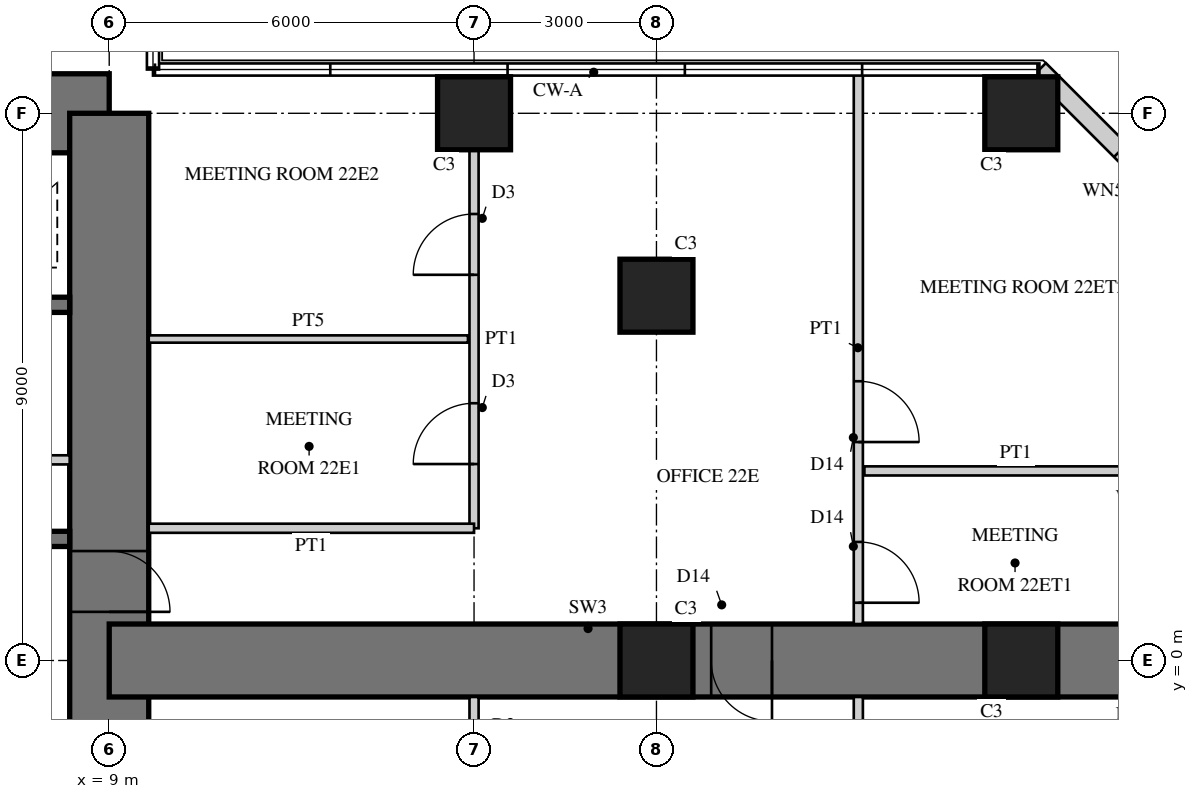
"""IFC4 building model, lengths in metres.
Left out: names, types, materials, properties, quantities, classifications, styles, units other than length and angle.
Written with IfcOpenShell. Run it as: python <this file> out.ifc"""

import sys

from ifc_helpers import new_model, si_unit, direction, frame, frame_2d, origin, origin_2d, place, context, subcontext, project, spatial, rectangle, extrude, element, fill, save


model = new_model("IFC4")
c1 = context("Model", 3, precision=1e-05, world=origin(), true_north=direction((0.0, 1.0)))
c2 = subcontext(c1, "Body", "Model", "MODEL_VIEW")
j1 = project(units=[si_unit("LENGTHUNIT", "METRE"), si_unit("PLANEANGLEUNIT", "RADIAN")], contexts=[c1])
p1 = place(None, origin())
s1 = spatial("IfcSite", under=j1, at=p1, CompositionType="ELEMENT")
p2 = place(p1, origin())
s2 = spatial("IfcBuilding", under=s1, at=p2, CompositionType="ELEMENT")
p3 = place(p2, frame((0.0, 0.0, 91.5)))
s3 = spatial("IfcBuildingStorey", under=s2, at=p3, CompositionType="ELEMENT", Elevation=91.5)
p4 = place(p3, frame((9.0, 9.0, 0.0), z_axis=(0.0, 0.0, 1.0), x_axis=(-1.0, 0.0, 0.0)))
e1 = element("IfcWall", 1, at=p4, inside=s3, PredefinedType="SHEAR", context=c2, shape_type="SweptSolid", body=[
    extrude(rectangle(XDim=18.0, YDim=1.3, at=frame_2d((9.0, 0.0))), origin(), (0.0, 0.0, 1.0), 4.0),
])
p5 = place(p4, frame((9.8, 0.0, 0.0)))
e2 = element("IfcOpeningElement", 2, at=p5, cuts=e1, PredefinedType="OPENING", context=c2, shape_type="SweptSolid", body=[
    extrude(rectangle(XDim=1.0, YDim=2.4, at=frame_2d((0.5, 1.2))), frame((0.0, 0.66, 0.0), z_axis=(0.0, -1.0, 0.0), x_axis=(1.0, 0.0, 0.0)), (0.0, 0.0, 1.0), 1.32),
])
p6 = place(p3, frame((9.0, -9.0, 0.0), z_axis=(0.0, 0.0, 1.0), x_axis=(0.0, 1.0, 0.0)))
e3 = element("IfcWall", 3, at=p6, inside=s3, PredefinedType="SHEAR", context=c2, shape_type="SweptSolid", body=[
    extrude(rectangle(XDim=18.0, YDim=1.3, at=frame_2d((9.0, 0.0))), origin(), (0.0, 0.0, 1.0), 4.0),
])
p7 = place(p6, frame((9.8, 0.0, 0.0)))
e4 = element("IfcOpeningElement", 4, at=p7, cuts=e3, PredefinedType="OPENING", context=c2, shape_type="SweptSolid", body=[
    extrude(rectangle(XDim=1.0, YDim=2.4, at=frame_2d((0.5, 1.2))), frame((0.0, 0.66, 0.0), z_axis=(0.0, -1.0, 0.0), x_axis=(1.0, 0.0, 0.0)), (0.0, 0.0, 1.0), 1.32),
])
p8 = place(p3, frame((1.925, 2.0, 0.0), z_axis=(0.0, 0.0, 1.0), x_axis=(1.0, 0.0, 0.0)))
e5 = element("IfcWall", 5, at=p8, inside=s3, PredefinedType="SHEAR", context=c2, shape_type="SweptSolid", body=[
    extrude(rectangle(XDim=6.425, YDim=0.25, at=frame_2d((3.212, 0.0))), origin(), (0.0, 0.0, 1.0), 4.0),
])
p9 = place(p3, frame((1.925, 5.85, 0.0), z_axis=(0.0, 0.0, 1.0), x_axis=(1.0, 0.0, 0.0)))
e6 = element("IfcWall", 6, at=p9, inside=s3, PredefinedType="SHEAR", context=c2, shape_type="SweptSolid", body=[
    extrude(rectangle(XDim=6.425, YDim=0.25, at=frame_2d((3.212, 0.0))), origin(), (0.0, 0.0, 1.0), 4.0),
])
p10 = place(p9, frame((0.454, 0.0, 0.0)))
e7 = element("IfcOpeningElement", 7, at=p10, cuts=e6, PredefinedType="OPENING", context=c2, shape_type="SweptSolid", body=[
    extrude(rectangle(XDim=1.1, YDim=2.2, at=frame_2d((0.55, 1.1))), frame((0.0, 0.135, 0.0), z_axis=(0.0, -1.0, 0.0), x_axis=(1.0, 0.0, 0.0)), (0.0, 0.0, 1.0), 0.27),
])
p11 = place(p9, frame((2.663, 0.0, 0.0)))
e8 = element("IfcOpeningElement", 8, at=p11, cuts=e6, PredefinedType="OPENING", context=c2, shape_type="SweptSolid", body=[
    extrude(rectangle(XDim=1.1, YDim=2.2, at=frame_2d((0.55, 1.1))), frame((0.0, 0.135, 0.0), z_axis=(0.0, -1.0, 0.0), x_axis=(1.0, 0.0, 0.0)), (0.0, 0.0, 1.0), 0.27),
])
p12 = place(p9, frame((4.871, 0.0, 0.0)))
e9 = element("IfcOpeningElement", 9, at=p12, cuts=e6, PredefinedType="OPENING", context=c2, shape_type="SweptSolid", body=[
    extrude(rectangle(XDim=1.1, YDim=2.2, at=frame_2d((0.55, 1.1))), frame((0.0, 0.135, 0.0), z_axis=(0.0, -1.0, 0.0), x_axis=(1.0, 0.0, 0.0)), (0.0, 0.0, 1.0), 0.27),
])
p13 = place(p3, frame((1.925, 3.3, 0.0), z_axis=(0.0, 0.0, 1.0), x_axis=(1.0, 0.0, 0.0)))
e10 = element("IfcWall", 10, at=p13, inside=s3, PredefinedType="PARTITIONING", context=c2, shape_type="SweptSolid", body=[
    extrude(rectangle(XDim=6.425, YDim=0.15, at=frame_2d((3.212, 0.0))), origin(), (0.0, 0.0, 1.0), 4.0),
])
p14 = place(p13, frame((0.075, 0.0, 0.0)))
e11 = element("IfcOpeningElement", 11, at=p14, cuts=e10, PredefinedType="OPENING", context=c2, shape_type="SweptSolid", body=[
    extrude(rectangle(XDim=0.8, YDim=2.1, at=frame_2d((0.4, 1.05))), frame((0.0, 0.085, 0.0), z_axis=(0.0, -1.0, 0.0), x_axis=(1.0, 0.0, 0.0)), (0.0, 0.0, 1.0), 0.17),
])
p15 = place(p13, frame((3.675, 0.0, 0.0)))
e12 = element("IfcOpeningElement", 12, at=p15, cuts=e10, PredefinedType="OPENING", context=c2, shape_type="SweptSolid", body=[
    extrude(rectangle(XDim=0.8, YDim=2.1, at=frame_2d((0.4, 1.05))), frame((0.0, 0.085, 0.0), z_axis=(0.0, -1.0, 0.0), x_axis=(1.0, 0.0, 0.0)), (0.0, 0.0, 1.0), 0.17),
])
p16 = place(p3, frame((9.0, 0.0, 0.0), z_axis=(0.0, 0.0, 1.0), x_axis=(1.0, 0.0, 0.0)))
e13 = element("IfcWall", 13, at=p16, inside=s3, PredefinedType="SHEAR", context=c2, shape_type="SweptSolid", body=[
    extrude(rectangle(XDim=18.0, YDim=1.2, at=frame_2d((9.0, 0.0))), origin(), (0.0, 0.0, 1.0), 4.0),
])
p17 = place(p16, frame((9.9, 0.0, 0.0)))
e14 = element("IfcOpeningElement", 14, at=p17, cuts=e13, PredefinedType="OPENING", context=c2, shape_type="SweptSolid", body=[
    extrude(rectangle(XDim=1.0, YDim=2.2, at=frame_2d((0.5, 1.1))), frame((0.0, 0.61, 0.0), z_axis=(0.0, -1.0, 0.0), x_axis=(1.0, 0.0, 0.0)), (0.0, 0.0, 1.0), 1.22),
])
for number, where, z_axis, x_axis in (
    (15, (15.0, 9.0, 0.0), (0.0, 0.0, 1.0), (1.0, 0.0, 0.0)),
    (16, (24.0, 9.0, 0.0), (0.0, 0.0, 1.0), (1.0, 0.0, 0.0)),
    (17, (18.0, 0.0, 0.0), (0.0, 0.0, 1.0), (1.0, 0.0, 0.0)),
    (18, (18.0, 6.0, 0.0), (0.0, 0.0, 1.0), (1.0, 0.0, 0.0)),
    (19, (24.0, 0.0, 0.0), (0.0, 0.0, 1.0), (1.0, 0.0, 0.0)),
):
    element("IfcColumn", number, at=place(p3, frame(where, z_axis=z_axis, x_axis=x_axis)), inside=s3, PredefinedType="COLUMN", context=c2, shape_type="SweptSolid", body=[
        extrude(rectangle(XDim=1.2, YDim=1.2, at=origin_2d()), origin(), (0.0, 0.0, 1.0), 4.0),
    ])
p18 = place(p3, frame((27.6, 6.418, 0.0), z_axis=(0.0, 0.0, 1.0), x_axis=(-0.707106781187, 0.707106781187, 0.0)))
e20 = element("IfcWall", 20, at=p18, inside=s3, PredefinedType="SOLIDWALL", context=c2, shape_type="SweptSolid", body=[
    extrude(rectangle(XDim=4.669, YDim=0.3, at=frame_2d((2.335, 0.0))), origin(), (0.0, 0.0, 1.0), 3.75),
])
p19 = place(p18, frame((1.885, 0.0, 0.3)))
e21 = element("IfcOpeningElement", 21, at=p19, cuts=e20, PredefinedType="OPENING", context=c2, shape_type="SweptSolid", body=[
    extrude(rectangle(XDim=0.9, YDim=2.4, at=frame_2d((0.45, 1.2))), frame((0.0, 0.16, 0.0), z_axis=(0.0, -1.0, 0.0), x_axis=(1.0, 0.0, 0.0)), (0.0, 0.0, 1.0), 0.32),
])
p20 = place(p3, frame((15.0, 2.175, 0.0), z_axis=(0.0, 0.0, 1.0), x_axis=(0.0, 1.0, 0.0)))
e22 = element("IfcWall", 22, at=p20, inside=s3, PredefinedType="PARTITIONING", context=c2, shape_type="SweptSolid", body=[
    extrude(rectangle(XDim=6.225, YDim=0.15, at=frame_2d((3.112, 0.0))), origin(), (0.0, 0.0, 1.0), 2.7),
])
p21 = place(p20, frame((1.056, 0.0, 0.0)))
e23 = element("IfcOpeningElement", 23, at=p21, cuts=e22, PredefinedType="OPENING", context=c2, shape_type="SweptSolid", body=[
    extrude(rectangle(XDim=1.0, YDim=2.1, at=frame_2d((0.5, 1.05))), frame((0.0, 0.085, 0.0), z_axis=(0.0, -1.0, 0.0), x_axis=(1.0, 0.0, 0.0)), (0.0, 0.0, 1.0), 0.17),
])
p22 = place(p20, frame((4.169, 0.0, 0.0)))
e24 = element("IfcOpeningElement", 24, at=p22, cuts=e22, PredefinedType="OPENING", context=c2, shape_type="SweptSolid", body=[
    extrude(rectangle(XDim=1.0, YDim=2.1, at=frame_2d((0.5, 1.05))), frame((0.0, 0.085, 0.0), z_axis=(0.0, -1.0, 0.0), x_axis=(1.0, 0.0, 0.0)), (0.0, 0.0, 1.0), 0.17),
])
p23 = place(p3, frame((9.65, 2.175, 0.0), z_axis=(0.0, 0.0, 1.0), x_axis=(1.0, 0.0, 0.0)))
e25 = element("IfcWall", 25, at=p23, inside=s3, PredefinedType="PARTITIONING", context=c2, shape_type="SweptSolid", body=[
    extrude(rectangle(XDim=5.35, YDim=0.15, at=frame_2d((2.675, 0.0))), origin(), (0.0, 0.0, 1.0), 3.75),
])
p24 = place(p3, frame((9.65, 5.288, 0.0), z_axis=(0.0, 0.0, 1.0), x_axis=(1.0, 0.0, 0.0)))
e26 = element("IfcWall", 26, at=p24, inside=s3, PredefinedType="PLUMBINGWALL", context=c2, shape_type="SweptSolid", body=[
    extrude(rectangle(XDim=5.25, YDim=0.12, at=frame_2d((2.625, 0.0))), origin(), (0.0, 0.0, 1.0), 3.75),
])
p25 = place(p3, frame((15.0, -8.4, 0.0), z_axis=(0.0, 0.0, 1.0), x_axis=(0.0, 1.0, 0.0)))
e27 = element("IfcWall", 27, at=p25, inside=s3, PredefinedType="PARTITIONING", context=c2, shape_type="SweptSolid", body=[
    extrude(rectangle(XDim=7.8, YDim=0.15, at=frame_2d((3.9, 0.0))), origin(), (0.0, 0.0, 1.0), 2.7),
])
p26 = place(p25, frame((0.783, 0.0, 0.0)))
e28 = element("IfcOpeningElement", 28, at=p26, cuts=e27, PredefinedType="OPENING", context=c2, shape_type="SweptSolid", body=[
    extrude(rectangle(XDim=1.0, YDim=2.1, at=frame_2d((0.5, 1.05))), frame((0.0, 0.085, 0.0), z_axis=(0.0, -1.0, 0.0), x_axis=(1.0, 0.0, 0.0)), (0.0, 0.0, 1.0), 0.17),
])
p27 = place(p25, frame((3.35, 0.0, 0.0)))
e29 = element("IfcOpeningElement", 29, at=p27, cuts=e27, PredefinedType="OPENING", context=c2, shape_type="SweptSolid", body=[
    extrude(rectangle(XDim=1.0, YDim=2.1, at=frame_2d((0.5, 1.05))), frame((0.0, 0.085, 0.0), z_axis=(0.0, -1.0, 0.0), x_axis=(1.0, 0.0, 0.0)), (0.0, 0.0, 1.0), 0.17),
])
p28 = place(p25, frame((5.967, 0.0, 0.0)))
e30 = element("IfcOpeningElement", 30, at=p28, cuts=e27, PredefinedType="OPENING", context=c2, shape_type="SweptSolid", body=[
    extrude(rectangle(XDim=1.0, YDim=2.1, at=frame_2d((0.5, 1.05))), frame((0.0, 0.085, 0.0), z_axis=(0.0, -1.0, 0.0), x_axis=(1.0, 0.0, 0.0)), (0.0, 0.0, 1.0), 0.17),
])
p29 = place(p3, frame((21.42, 3.118, 0.0), z_axis=(0.0, 0.0, 1.0), x_axis=(1.0, 0.0, 0.0)))
e31 = element("IfcWall", 31, at=p29, inside=s3, PredefinedType="PARTITIONING", context=c2, shape_type="SweptSolid", body=[
    extrude(rectangle(XDim=4.98, YDim=0.15, at=frame_2d((2.49, 0.0))), origin(), (0.0, 0.0, 1.0), 3.75),
])
p30 = place(p3, frame((21.32, 0.6, 0.0), z_axis=(0.0, 0.0, 1.0), x_axis=(0.0, 1.0, 0.0)))
e32 = element("IfcWall", 32, at=p30, inside=s3, PredefinedType="PARTITIONING", context=c2, shape_type="SweptSolid", body=[
    extrude(rectangle(XDim=9.08, YDim=0.15, at=frame_2d((4.54, 0.0))), origin(), (0.0, 0.0, 1.0), 3.75),
])
p31 = place(p30, frame((0.35, 0.0, 0.0)))
e33 = element("IfcOpeningElement", 33, at=p31, cuts=e32, PredefinedType="OPENING", context=c2, shape_type="SweptSolid", body=[
    extrude(rectangle(XDim=1.0, YDim=2.2, at=frame_2d((0.5, 1.1))), frame((0.0, 0.085, 0.0), z_axis=(0.0, -1.0, 0.0), x_axis=(1.0, 0.0, 0.0)), (0.0, 0.0, 1.0), 0.17),
])
p32 = place(p30, frame((2.993, 0.0, 0.0)))
e34 = element("IfcOpeningElement", 34, at=p32, cuts=e32, PredefinedType="OPENING", context=c2, shape_type="SweptSolid", body=[
    extrude(rectangle(XDim=1.0, YDim=2.2, at=frame_2d((0.5, 1.1))), frame((0.0, 0.085, 0.0), z_axis=(0.0, -1.0, 0.0), x_axis=(1.0, 0.0, 0.0)), (0.0, 0.0, 1.0), 0.17),
])
p33 = place(p3, frame((21.32, -9.68, 0.0), z_axis=(0.0, 0.0, 1.0), x_axis=(0.0, 1.0, 0.0)))
e35 = element("IfcWall", 35, at=p33, inside=s3, PredefinedType="PARTITIONING", context=c2, shape_type="SweptSolid", body=[
    extrude(rectangle(XDim=9.08, YDim=0.15, at=frame_2d((4.54, 0.0))), origin(), (0.0, 0.0, 1.0), 3.75),
])
p34 = place(p33, frame((7.63, 0.0, 0.0)))
e36 = element("IfcOpeningElement", 36, at=p34, cuts=e35, PredefinedType="OPENING", context=c2, shape_type="SweptSolid", body=[
    extrude(rectangle(XDim=1.0, YDim=2.2, at=frame_2d((0.5, 1.1))), frame((0.0, 0.085, 0.0), z_axis=(0.0, -1.0, 0.0), x_axis=(1.0, 0.0, 0.0)), (0.0, 0.0, 1.0), 0.17),
])
p35 = place(p21, origin())
e37 = element("IfcDoor", 37, at=p35, inside=s3, OperationType="SINGLE_SWING_LEFT", PredefinedType="DOOR", context=c2, shape_type="SweptSolid", body=[
    extrude(rectangle(XDim=1.0, YDim=2.1, at=frame_2d((0.5, 1.05))), frame((0.0, 0.025, 0.0), z_axis=(0.0, -1.0, 0.0), x_axis=(1.0, 0.0, 0.0)), (0.0, 0.0, 1.0), 0.05),
])
fill(e23, e37)
p36 = place(p22, origin())
e38 = element("IfcDoor", 38, at=p36, inside=s3, OperationType="SINGLE_SWING_LEFT", PredefinedType="DOOR", context=c2, shape_type="SweptSolid", body=[
    extrude(rectangle(XDim=1.0, YDim=2.1, at=frame_2d((0.5, 1.05))), frame((0.0, 0.025, 0.0), z_axis=(0.0, -1.0, 0.0), x_axis=(1.0, 0.0, 0.0)), (0.0, 0.0, 1.0), 0.05),
])
fill(e24, e38)
p37 = place(p31, frame((1.0, 0.0, 0.0), z_axis=(0.0, 0.0, 1.0), x_axis=(-1.0, 0.0, 0.0)))
e39 = element("IfcDoor", 39, at=p37, inside=s3, OperationType="SINGLE_SWING_RIGHT", PredefinedType="DOOR", context=c2, shape_type="SweptSolid", body=[
    extrude(rectangle(XDim=1.0, YDim=2.2, at=frame_2d((0.5, 1.1))), frame((0.0, 0.025, 0.0), z_axis=(0.0, -1.0, 0.0), x_axis=(1.0, 0.0, 0.0)), (0.0, 0.0, 1.0), 0.05),
])
fill(e33, e39)
p38 = place(p32, frame((1.0, 0.0, 0.0), z_axis=(0.0, 0.0, 1.0), x_axis=(-1.0, 0.0, 0.0)))
e40 = element("IfcDoor", 40, at=p38, inside=s3, OperationType="SINGLE_SWING_RIGHT", PredefinedType="DOOR", context=c2, shape_type="SweptSolid", body=[
    extrude(rectangle(XDim=1.0, YDim=2.2, at=frame_2d((0.5, 1.1))), frame((0.0, 0.025, 0.0), z_axis=(0.0, -1.0, 0.0), x_axis=(1.0, 0.0, 0.0)), (0.0, 0.0, 1.0), 0.05),
])
fill(e34, e40)
p39 = place(p17, frame((1.0, 0.0, 0.0), z_axis=(0.0, 0.0, 1.0), x_axis=(-1.0, 0.0, 0.0)))
e41 = element("IfcDoor", 41, at=p39, inside=s3, OperationType="SINGLE_SWING_LEFT", PredefinedType="DOOR", context=c2, shape_type="SweptSolid", body=[
    extrude(rectangle(XDim=1.0, YDim=2.2, at=frame_2d((0.5, 1.1))), frame((0.0, 0.025, 0.0), z_axis=(0.0, -1.0, 0.0), x_axis=(1.0, 0.0, 0.0)), (0.0, 0.0, 1.0), 0.05),
])
fill(e14, e41)
p40 = place(p7, frame((1.0, 0.0, 0.0), z_axis=(0.0, 0.0, 1.0), x_axis=(-1.0, 0.0, 0.0)))
e42 = element("IfcDoor", 42, at=p40, inside=s3, OperationType="SINGLE_SWING_RIGHT", PredefinedType="DOOR", context=c2, shape_type="SweptSolid", body=[
    extrude(rectangle(XDim=1.0, YDim=2.4, at=frame_2d((0.5, 1.2))), frame((0.0, -0.005, 0.0), z_axis=(0.0, -1.0, 0.0), x_axis=(1.0, 0.0, 0.0)), (0.0, 0.0, 1.0), 0.05),
])
fill(e4, e42)
save(model, sys.argv[1])
